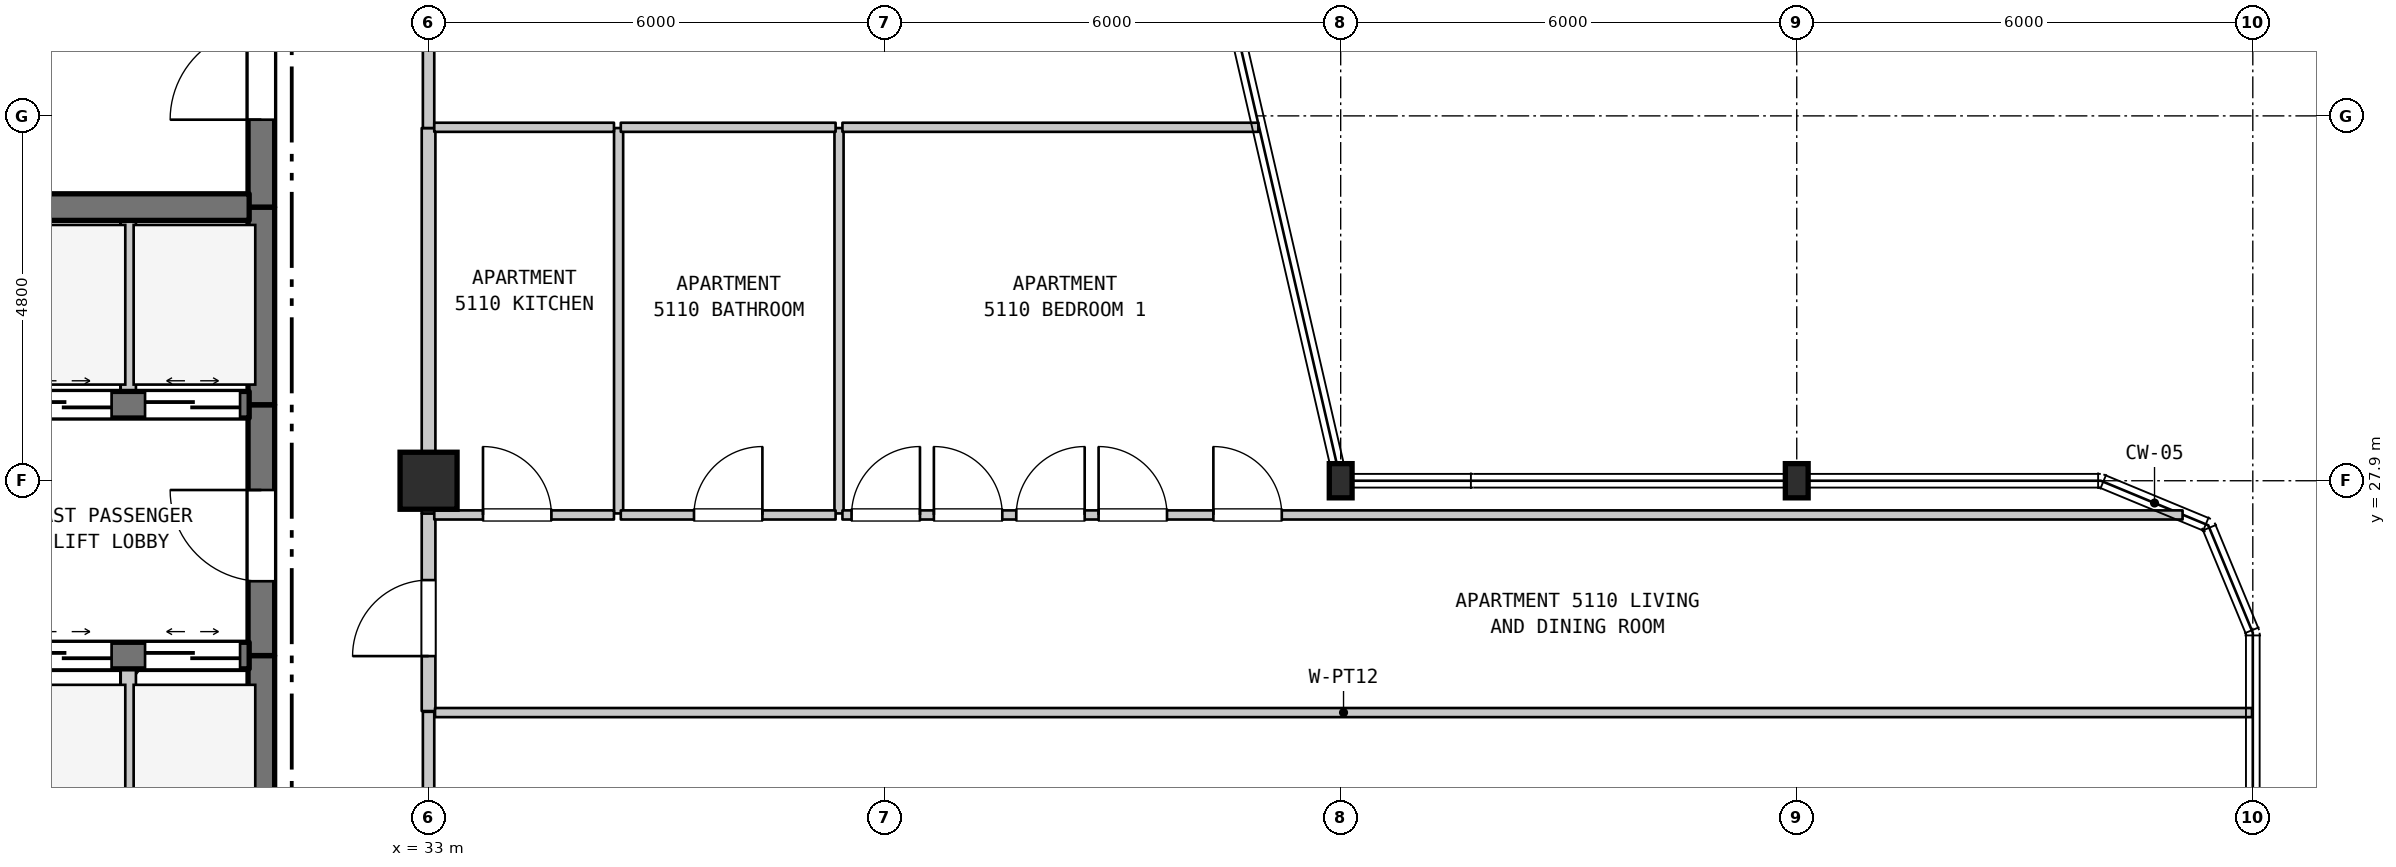
"""IFC4 building model, lengths in metres.
Left out: names, types, materials, properties, quantities, classifications, styles, units other than length and angle.
Written with IfcOpenShell. Run it as: python <this file> out.ifc"""

import sys

from ifc_helpers import new_model, si_unit, direction, frame, frame_2d, origin, origin_2d, place, context, subcontext, project, spatial, rectangle, i_section, extrude, element, fill, save


model = new_model("IFC4")
c1 = context("Model", 3, precision=1e-05, world=origin(), true_north=direction((0.0, 1.0)))
c2 = subcontext(c1, "Body", "Model", "MODEL_VIEW")
j1 = project(units=[si_unit("LENGTHUNIT", "METRE"), si_unit("PLANEANGLEUNIT", "RADIAN")], contexts=[c1])
p1 = place(None, origin())
s1 = spatial("IfcSite", under=j1, at=p1, CompositionType="ELEMENT")
p2 = place(p1, origin())
s2 = spatial("IfcBuilding", under=s1, at=p2, CompositionType="ELEMENT")
p3 = place(p2, frame((0.0, 0.0, 206.9)))
s3 = spatial("IfcBuildingStorey", under=s2, at=p3, CompositionType="ELEMENT", Elevation=206.9)
p4 = place(p3, frame((33.0, 27.9, 0.0), z_axis=(0.0, 0.0, 1.0), x_axis=(1.0, 0.0, 0.0)))
e1 = element("IfcColumn", 1, at=p4, inside=s3, PredefinedType="COLUMN", context=c2, shape_type="SweptSolid", body=[
    extrude(rectangle(XDim=0.75, YDim=0.75, at=origin_2d()), origin(), (0.0, 0.0, 1.0), 3.7),
])
for number, where, z_axis, x_axis in (
    (2, (45.0, 27.9, 0.0), (0.0, 0.0, 1.0), (1.0, 0.0, 0.0)),
    (3, (51.0, 27.9, 0.0), (0.0, 0.0, 1.0), (1.0, 0.0, 0.0)),
):
    element("IfcColumn", number, at=place(p3, frame(where, z_axis=z_axis, x_axis=x_axis)), inside=s3, PredefinedType="COLUMN", context=c2, shape_type="SweptSolid", body=[
        extrude(i_section(OverallWidth=0.3, OverallDepth=0.45, WebThickness=0.014, FlangeThickness=0.026, FilletRadius=0.027, at=origin_2d()), origin(), (0.0, 0.0, 1.0), 3.7),
    ])
p5 = place(p3, frame((29.05, 22.7, 0.0), z_axis=(0.0, 0.0, 1.0), x_axis=(0.0, 1.0, 0.0)))
e4 = element("IfcWall", 4, at=p5, inside=s3, PredefinedType="STANDARD", context=c2, shape_type="SweptSolid", body=[
    extrude(rectangle(XDim=2.9, YDim=0.2, at=frame_2d((1.45, 0.0))), origin(), (0.0, 0.0, 1.0), 3.39),
])
p6 = place(p3, frame((29.05, 28.9, 0.0), z_axis=(0.0, 0.0, 1.0), x_axis=(0.0, 1.0, 0.0)))
e5 = element("IfcWall", 5, at=p6, inside=s3, PredefinedType="STANDARD", context=c2, shape_type="SweptSolid", body=[
    extrude(rectangle(XDim=2.6, YDim=0.2, at=frame_2d((1.3, 0.0))), origin(), (0.0, 0.0, 1.0), 3.39),
])
p7 = place(p3, frame((30.8, 22.7, 0.0), z_axis=(0.0, 0.0, 1.0), x_axis=(0.0, 1.0, 0.0)))
e6 = element("IfcWall", 6, at=p7, inside=s3, PredefinedType="SHEAR", context=c2, shape_type="SweptSolid", body=[
    extrude(rectangle(XDim=2.9, YDim=0.35, at=frame_2d((1.45, 0.0))), origin(), (0.0, 0.0, 1.0), 3.39),
])
p8 = place(p3, frame((30.8, 25.6, 0.0), z_axis=(0.0, 0.0, 1.0), x_axis=(0.0, 1.0, 0.0)))
e7 = element("IfcWall", 7, at=p8, inside=s3, PredefinedType="SHEAR", context=c2, shape_type="SweptSolid", body=[
    extrude(rectangle(XDim=3.3, YDim=0.35, at=frame_2d((1.65, 0.0))), origin(), (0.0, 0.0, 1.0), 3.39),
])
p9 = place(p8, frame((0.978, 0.0, 0.0)))
e8 = element("IfcOpeningElement", 8, at=p9, cuts=e7, PredefinedType="OPENING", context=c2, shape_type="SweptSolid", body=[
    extrude(rectangle(XDim=1.2, YDim=2.2, at=frame_2d((0.6, 1.1))), frame((0.0, 0.185, 0.0), z_axis=(0.0, -1.0, 0.0), x_axis=(1.0, 0.0, 0.0)), (0.0, 0.0, 1.0), 0.37),
])
p10 = place(p3, frame((30.8, 28.9, 0.0), z_axis=(0.0, 0.0, 1.0), x_axis=(0.0, 1.0, 0.0)))
e9 = element("IfcWall", 9, at=p10, inside=s3, PredefinedType="SHEAR", context=c2, shape_type="SweptSolid", body=[
    extrude(rectangle(XDim=2.6, YDim=0.35, at=frame_2d((1.3, 0.0))), origin(), (0.0, 0.0, 1.0), 3.39),
])
p11 = place(p3, frame((30.8, 31.5, 0.0), z_axis=(0.0, 0.0, 1.0), x_axis=(0.0, 1.0, 0.0)))
e10 = element("IfcWall", 10, at=p11, inside=s3, PredefinedType="SHEAR", context=c2, shape_type="SweptSolid", body=[
    extrude(rectangle(XDim=3.5, YDim=0.35, at=frame_2d((1.75, 0.0))), origin(), (0.0, 0.0, 1.0), 3.39),
])
p12 = place(p11, frame((1.15, 0.0, 0.0)))
e11 = element("IfcOpeningElement", 11, at=p12, cuts=e10, PredefinedType="OPENING", context=c2, shape_type="SweptSolid", body=[
    extrude(rectangle(XDim=1.2, YDim=2.2, at=frame_2d((0.6, 1.1))), frame((0.0, 0.185, 0.0), z_axis=(0.0, -1.0, 0.0), x_axis=(1.0, 0.0, 0.0)), (0.0, 0.0, 1.0), 0.37),
])
p13 = place(p3, frame((33.0, 19.51, 0.0), z_axis=(0.0, 0.0, 1.0), x_axis=(0.0, 1.0, 0.0)))
e12 = element("IfcWall", 12, at=p13, inside=s3, PredefinedType="STANDARD", context=c2, shape_type="SweptSolid", body=[
    extrude(rectangle(XDim=5.35, YDim=0.15, at=frame_2d((2.675, 0.0))), origin(), (0.0, 0.0, 1.0), 2.99),
])
p14 = place(p13, frame((1.534, 0.0, 0.0)))
e13 = element("IfcOpeningElement", 13, at=p14, cuts=e12, PredefinedType="OPENING", context=c2, shape_type="SweptSolid", body=[
    extrude(rectangle(XDim=1.0, YDim=2.15, at=frame_2d((0.5, 1.075))), frame((0.0, 0.085, 0.0), z_axis=(0.0, -1.0, 0.0), x_axis=(1.0, 0.0, 0.0)), (0.0, 0.0, 1.0), 0.17),
])
p15 = place(p3, frame((33.0, 24.87, 0.0), z_axis=(0.0, 0.0, 1.0), x_axis=(0.0, 1.0, 0.0)))
e14 = element("IfcWall", 14, at=p15, inside=s3, PredefinedType="STANDARD", context=c2, shape_type="SweptSolid", body=[
    extrude(rectangle(XDim=2.6, YDim=0.18, at=frame_2d((1.3, 0.0))), origin(), (0.0, 0.0, 1.0), 2.99),
])
p16 = place(p15, frame((0.723, 0.0, 0.0)))
e15 = element("IfcOpeningElement", 15, at=p16, cuts=e14, PredefinedType="OPENING", context=c2, shape_type="SweptSolid", body=[
    extrude(rectangle(XDim=1.0, YDim=2.15, at=frame_2d((0.5, 1.075))), frame((0.0, 0.1, 0.0), z_axis=(0.0, -1.0, 0.0), x_axis=(1.0, 0.0, 0.0)), (0.0, 0.0, 1.0), 0.2),
])
p17 = place(p3, frame((33.0, 27.47, 0.0), z_axis=(0.0, 0.0, 1.0), x_axis=(0.0, 1.0, 0.0)))
e16 = element("IfcWall", 16, at=p17, inside=s3, PredefinedType="STANDARD", context=c2, shape_type="SweptSolid", body=[
    extrude(rectangle(XDim=5.07, YDim=0.18, at=frame_2d((2.535, 0.0))), origin(), (0.0, 0.0, 1.0), 2.89),
])
p18 = place(p3, frame((33.0, 32.54, 0.0), z_axis=(0.0, 0.0, 1.0), x_axis=(0.0, 1.0, 0.0)))
e17 = element("IfcWall", 17, at=p18, inside=s3, PredefinedType="STANDARD", context=c2, shape_type="SweptSolid", body=[
    extrude(rectangle(XDim=5.36, YDim=0.15, at=frame_2d((2.68, 0.0))), origin(), (0.0, 0.0, 1.0), 2.89),
])
p19 = place(p18, frame((2.109, 0.0, 0.0)))
e18 = element("IfcOpeningElement", 18, at=p19, cuts=e17, PredefinedType="OPENING", context=c2, shape_type="SweptSolid", body=[
    extrude(rectangle(XDim=1.0, YDim=2.15, at=frame_2d((0.5, 1.075))), frame((0.0, 0.085, 0.0), z_axis=(0.0, -1.0, 0.0), x_axis=(1.0, 0.0, 0.0)), (0.0, 0.0, 1.0), 0.17),
])
for number, where, z_axis, x_axis in (
    (19, (35.5, 27.47, 0.0), (0.0, 0.0, 1.0), (0.0, 1.0, 0.0)),
    (20, (38.4, 27.47, 0.0), (0.0, 0.0, 1.0), (0.0, 1.0, 0.0)),
):
    element("IfcWall", number, at=place(p3, frame(where, z_axis=z_axis, x_axis=x_axis)), inside=s3, PredefinedType="PARTITIONING", context=c2, shape_type="SweptSolid", body=[
        extrude(rectangle(XDim=5.07, YDim=0.12, at=frame_2d((2.535, 0.0))), origin(), (0.0, 0.0, 1.0), 3.39),
    ])
p20 = place(p3, frame((33.085, 24.85, 0.0), z_axis=(0.0, 0.0, 1.0), x_axis=(1.0, 0.0, 0.0)))
e21 = element("IfcWall", 21, at=p20, inside=s3, PredefinedType="PARTITIONING", context=c2, shape_type="SweptSolid", body=[
    extrude(rectangle(XDim=23.905, YDim=0.12, at=frame_2d((11.953, 0.0))), origin(), (0.0, 0.0, 1.0), 3.39),
])
p21 = place(p3, frame((27.46, 25.6, 0.0), z_axis=(0.0, 0.0, 1.0), x_axis=(1.0, 0.0, 0.0)))
e22 = element("IfcWall", 22, at=p21, inside=s3, PredefinedType="SHEAR", context=c2, shape_type="SweptSolid", body=[
    extrude(rectangle(XDim=3.18, YDim=0.35, at=frame_2d((1.59, 0.0))), origin(), (0.0, 0.0, 1.0), 3.39),
])
p22 = place(p21, frame((0.12, 0.0, 0.0)))
e23 = element("IfcOpeningElement", 23, at=p22, cuts=e22, PredefinedType="OPENING", context=c2, shape_type="SweptSolid", body=[
    extrude(rectangle(XDim=1.25, YDim=2.2, at=frame_2d((0.625, 1.1))), frame((0.0, 0.185, 0.0), z_axis=(0.0, -1.0, 0.0), x_axis=(1.0, 0.0, 0.0)), (0.0, 0.0, 1.0), 0.37),
])
p23 = place(p21, frame((1.81, 0.0, 0.0)))
e24 = element("IfcOpeningElement", 24, at=p23, cuts=e22, PredefinedType="OPENING", context=c2, shape_type="SweptSolid", body=[
    extrude(rectangle(XDim=1.25, YDim=2.2, at=frame_2d((0.625, 1.1))), frame((0.0, 0.185, 0.0), z_axis=(0.0, -1.0, 0.0), x_axis=(1.0, 0.0, 0.0)), (0.0, 0.0, 1.0), 0.37),
])
p24 = place(p3, frame((33.075, 27.45, 0.0), z_axis=(0.0, 0.0, 1.0), x_axis=(1.0, 0.0, 0.0)))
e25 = element("IfcWall", 25, at=p24, inside=s3, PredefinedType="PARTITIONING", context=c2, shape_type="SweptSolid", body=[
    extrude(rectangle(XDim=2.364, YDim=0.12, at=frame_2d((1.182, 0.0))), origin(), (0.0, 0.0, 1.0), 3.39),
])
p25 = place(p24, frame((0.641, 0.0, 0.0)))
e26 = element("IfcOpeningElement", 26, at=p25, cuts=e25, PredefinedType="OPENING", context=c2, shape_type="SweptSolid", body=[
    extrude(rectangle(XDim=0.9, YDim=2.15, at=frame_2d((0.45, 1.075))), frame((0.0, 0.07, 0.0), z_axis=(0.0, -1.0, 0.0), x_axis=(1.0, 0.0, 0.0)), (0.0, 0.0, 1.0), 0.14),
])
p26 = place(p3, frame((35.529, 27.45, 0.0), z_axis=(0.0, 0.0, 1.0), x_axis=(1.0, 0.0, 0.0)))
e27 = element("IfcWall", 27, at=p26, inside=s3, PredefinedType="PARTITIONING", context=c2, shape_type="SweptSolid", body=[
    extrude(rectangle(XDim=2.826, YDim=0.12, at=frame_2d((1.413, 0.0))), origin(), (0.0, 0.0, 1.0), 3.39),
])
p27 = place(p26, frame((0.963, 0.0, 0.0)))
e28 = element("IfcOpeningElement", 28, at=p27, cuts=e27, PredefinedType="OPENING", context=c2, shape_type="SweptSolid", body=[
    extrude(rectangle(XDim=0.9, YDim=2.1, at=frame_2d((0.45, 1.05))), frame((0.0, 0.07, 0.0), z_axis=(0.0, -1.0, 0.0), x_axis=(1.0, 0.0, 0.0)), (0.0, 0.0, 1.0), 0.14),
])
p28 = place(p3, frame((38.445, 27.45, 0.0), z_axis=(0.0, 0.0, 1.0), x_axis=(1.0, 0.0, 0.0)))
e29 = element("IfcWall", 29, at=p28, inside=s3, PredefinedType="PARTITIONING", context=c2, shape_type="SweptSolid", body=[
    extrude(rectangle(XDim=17.631, YDim=0.12, at=frame_2d((8.815, 0.0))), origin(), (0.0, 0.0, 1.0), 3.39),
])
p29 = place(p28, frame((4.88, 0.0, 0.0)))
e30 = element("IfcOpeningElement", 30, at=p29, cuts=e29, PredefinedType="OPENING", context=c2, shape_type="SweptSolid", body=[
    extrude(rectangle(XDim=0.9, YDim=2.15, at=frame_2d((0.45, 1.075))), frame((0.0, 0.07, 0.0), z_axis=(0.0, -1.0, 0.0), x_axis=(1.0, 0.0, 0.0)), (0.0, 0.0, 1.0), 0.14),
])
p30 = place(p28, frame((0.12, 0.0, 0.0)))
e31 = element("IfcOpeningElement", 31, at=p30, cuts=e29, PredefinedType="OPENING", context=c2, shape_type="SweptSolid", body=[
    extrude(rectangle(XDim=0.9, YDim=2.15, at=frame_2d((0.45, 1.075))), frame((0.0, 0.07, 0.0), z_axis=(0.0, -1.0, 0.0), x_axis=(1.0, 0.0, 0.0)), (0.0, 0.0, 1.0), 0.14),
])
p31 = place(p28, frame((1.203, 0.0, 0.0)))
e32 = element("IfcOpeningElement", 32, at=p31, cuts=e29, PredefinedType="OPENING", context=c2, shape_type="SweptSolid", body=[
    extrude(rectangle(XDim=0.9, YDim=2.15, at=frame_2d((0.45, 1.075))), frame((0.0, 0.07, 0.0), z_axis=(0.0, -1.0, 0.0), x_axis=(1.0, 0.0, 0.0)), (0.0, 0.0, 1.0), 0.14),
])
p32 = place(p28, frame((2.287, 0.0, 0.0)))
e33 = element("IfcOpeningElement", 33, at=p32, cuts=e29, PredefinedType="OPENING", context=c2, shape_type="SweptSolid", body=[
    extrude(rectangle(XDim=0.9, YDim=2.15, at=frame_2d((0.45, 1.075))), frame((0.0, 0.07, 0.0), z_axis=(0.0, -1.0, 0.0), x_axis=(1.0, 0.0, 0.0)), (0.0, 0.0, 1.0), 0.14),
])
p33 = place(p28, frame((3.37, 0.0, 0.0)))
e34 = element("IfcOpeningElement", 34, at=p33, cuts=e29, PredefinedType="OPENING", context=c2, shape_type="SweptSolid", body=[
    extrude(rectangle(XDim=0.9, YDim=2.15, at=frame_2d((0.45, 1.075))), frame((0.0, 0.07, 0.0), z_axis=(0.0, -1.0, 0.0), x_axis=(1.0, 0.0, 0.0)), (0.0, 0.0, 1.0), 0.14),
])
p34 = place(p3, frame((27.46, 28.9, 0.0), z_axis=(0.0, 0.0, 1.0), x_axis=(1.0, 0.0, 0.0)))
e35 = element("IfcWall", 35, at=p34, inside=s3, PredefinedType="SHEAR", context=c2, shape_type="SweptSolid", body=[
    extrude(rectangle(XDim=3.18, YDim=0.35, at=frame_2d((1.59, 0.0))), origin(), (0.0, 0.0, 1.0), 3.39),
])
p35 = place(p34, frame((0.12, 0.0, 0.0)))
e36 = element("IfcOpeningElement", 36, at=p35, cuts=e35, PredefinedType="OPENING", context=c2, shape_type="SweptSolid", body=[
    extrude(rectangle(XDim=1.25, YDim=2.2, at=frame_2d((0.625, 1.1))), frame((0.0, 0.185, 0.0), z_axis=(0.0, -1.0, 0.0), x_axis=(1.0, 0.0, 0.0)), (0.0, 0.0, 1.0), 0.37),
])
p36 = place(p34, frame((1.81, 0.0, 0.0)))
e37 = element("IfcOpeningElement", 37, at=p36, cuts=e35, PredefinedType="OPENING", context=c2, shape_type="SweptSolid", body=[
    extrude(rectangle(XDim=1.25, YDim=2.2, at=frame_2d((0.625, 1.1))), frame((0.0, 0.185, 0.0), z_axis=(0.0, -1.0, 0.0), x_axis=(1.0, 0.0, 0.0)), (0.0, 0.0, 1.0), 0.37),
])
p37 = place(p3, frame((27.46, 31.5, 0.0), z_axis=(0.0, 0.0, 1.0), x_axis=(1.0, 0.0, 0.0)))
e38 = element("IfcWall", 38, at=p37, inside=s3, PredefinedType="SHEAR", context=c2, shape_type="SweptSolid", body=[
    extrude(rectangle(XDim=3.18, YDim=0.35, at=frame_2d((1.59, 0.0))), origin(), (0.0, 0.0, 1.0), 3.39),
])
p38 = place(p3, frame((33.075, 32.55, 0.0), z_axis=(0.0, 0.0, 1.0), x_axis=(1.0, 0.0, 0.0)))
e39 = element("IfcWall", 39, at=p38, inside=s3, PredefinedType="PARTITIONING", context=c2, shape_type="SweptSolid", body=[
    extrude(rectangle(XDim=2.364, YDim=0.12, at=frame_2d((1.182, 0.0))), origin(), (0.0, 0.0, 1.0), 3.39),
])
p39 = place(p3, frame((35.529, 32.55, 0.0), z_axis=(0.0, 0.0, 1.0), x_axis=(1.0, 0.0, 0.0)))
e40 = element("IfcWall", 40, at=p39, inside=s3, PredefinedType="PARTITIONING", context=c2, shape_type="SweptSolid", body=[
    extrude(rectangle(XDim=2.826, YDim=0.12, at=frame_2d((1.413, 0.0))), origin(), (0.0, 0.0, 1.0), 3.39),
])
p40 = place(p3, frame((38.445, 32.55, 0.0), z_axis=(0.0, 0.0, 1.0), x_axis=(1.0, 0.0, 0.0)))
e41 = element("IfcWall", 41, at=p40, inside=s3, PredefinedType="PARTITIONING", context=c2, shape_type="SweptSolid", body=[
    extrude(rectangle(XDim=5.472, YDim=0.12, at=frame_2d((2.736, 0.0))), origin(), (0.0, 0.0, 1.0), 3.39),
])
p41 = place(p9, origin())
e42 = element("IfcDoor", 42, at=p41, inside=s3, OperationType="SINGLE_SWING_RIGHT", PredefinedType="DOOR", context=c2, shape_type="SweptSolid", body=[
    extrude(rectangle(XDim=1.2, YDim=2.2, at=frame_2d((0.6, 1.1))), frame((0.0, 0.025, 0.0), z_axis=(0.0, -1.0, 0.0), x_axis=(1.0, 0.0, 0.0)), (0.0, 0.0, 1.0), 0.05),
])
fill(e8, e42)
p42 = place(p12, origin())
e43 = element("IfcDoor", 43, at=p42, inside=s3, OperationType="SINGLE_SWING_LEFT", PredefinedType="DOOR", context=c2, shape_type="SweptSolid", body=[
    extrude(rectangle(XDim=1.2, YDim=2.2, at=frame_2d((0.6, 1.1))), frame((0.0, 0.025, 0.0), z_axis=(0.0, -1.0, 0.0), x_axis=(1.0, 0.0, 0.0)), (0.0, 0.0, 1.0), 0.05),
])
fill(e11, e43)
p43 = place(p16, origin())
e44 = element("IfcDoor", 44, at=p43, inside=s3, OperationType="SINGLE_SWING_LEFT", PredefinedType="DOOR", context=c2, shape_type="SweptSolid", body=[
    extrude(rectangle(XDim=1.0, YDim=2.15, at=frame_2d((0.5, 1.075))), frame((0.0, 0.025, 0.0), z_axis=(0.0, -1.0, 0.0), x_axis=(1.0, 0.0, 0.0)), (0.0, 0.0, 1.0), 0.05),
])
fill(e15, e44)
p44 = place(p22, origin())
e45 = element("IfcDoor", 45, at=p44, inside=s3, OperationType="DOUBLE_DOOR_SLIDING", PredefinedType="DOOR", context=c2, shape_type="SweptSolid", body=[
    extrude(rectangle(XDim=1.25, YDim=2.2, at=frame_2d((0.625, 1.1))), frame((0.0, 0.025, 0.0), z_axis=(0.0, -1.0, 0.0), x_axis=(1.0, 0.0, 0.0)), (0.0, 0.0, 1.0), 0.05),
])
fill(e23, e45)
p45 = place(p23, origin())
e46 = element("IfcDoor", 46, at=p45, inside=s3, OperationType="DOUBLE_DOOR_SLIDING", PredefinedType="DOOR", context=c2, shape_type="SweptSolid", body=[
    extrude(rectangle(XDim=1.25, YDim=2.2, at=frame_2d((0.625, 1.1))), frame((0.0, 0.025, 0.0), z_axis=(0.0, -1.0, 0.0), x_axis=(1.0, 0.0, 0.0)), (0.0, 0.0, 1.0), 0.05),
])
fill(e24, e46)
p46 = place(p25, origin())
e47 = element("IfcDoor", 47, at=p46, inside=s3, OperationType="SINGLE_SWING_LEFT", PredefinedType="DOOR", context=c2, shape_type="SweptSolid", body=[
    extrude(rectangle(XDim=0.9, YDim=2.15, at=frame_2d((0.45, 1.075))), frame((0.0, 0.025, 0.0), z_axis=(0.0, -1.0, 0.0), x_axis=(1.0, 0.0, 0.0)), (0.0, 0.0, 1.0), 0.05),
])
fill(e26, e47)
p47 = place(p27, origin())
e48 = element("IfcDoor", 48, at=p47, inside=s3, OperationType="SINGLE_SWING_RIGHT", PredefinedType="DOOR", context=c2, shape_type="SweptSolid", body=[
    extrude(rectangle(XDim=0.9, YDim=2.1, at=frame_2d((0.45, 1.05))), frame((0.0, 0.025, 0.0), z_axis=(0.0, -1.0, 0.0), x_axis=(1.0, 0.0, 0.0)), (0.0, 0.0, 1.0), 0.05),
])
fill(e28, e48)
p48 = place(p29, origin())
e49 = element("IfcDoor", 49, at=p48, inside=s3, OperationType="SINGLE_SWING_LEFT", PredefinedType="DOOR", context=c2, shape_type="SweptSolid", body=[
    extrude(rectangle(XDim=0.9, YDim=2.15, at=frame_2d((0.45, 1.075))), frame((0.0, 0.025, 0.0), z_axis=(0.0, -1.0, 0.0), x_axis=(1.0, 0.0, 0.0)), (0.0, 0.0, 1.0), 0.05),
])
fill(e30, e49)
p49 = place(p30, origin())
e50 = element("IfcDoor", 50, at=p49, inside=s3, OperationType="SINGLE_SWING_RIGHT", PredefinedType="DOOR", context=c2, shape_type="SweptSolid", body=[
    extrude(rectangle(XDim=0.9, YDim=2.15, at=frame_2d((0.45, 1.075))), frame((0.0, 0.025, 0.0), z_axis=(0.0, -1.0, 0.0), x_axis=(1.0, 0.0, 0.0)), (0.0, 0.0, 1.0), 0.05),
])
fill(e31, e50)
p50 = place(p31, origin())
e51 = element("IfcDoor", 51, at=p50, inside=s3, OperationType="SINGLE_SWING_LEFT", PredefinedType="DOOR", context=c2, shape_type="SweptSolid", body=[
    extrude(rectangle(XDim=0.9, YDim=2.15, at=frame_2d((0.45, 1.075))), frame((0.0, 0.025, 0.0), z_axis=(0.0, -1.0, 0.0), x_axis=(1.0, 0.0, 0.0)), (0.0, 0.0, 1.0), 0.05),
])
fill(e32, e51)
p51 = place(p32, origin())
e52 = element("IfcDoor", 52, at=p51, inside=s3, OperationType="SINGLE_SWING_RIGHT", PredefinedType="DOOR", context=c2, shape_type="SweptSolid", body=[
    extrude(rectangle(XDim=0.9, YDim=2.15, at=frame_2d((0.45, 1.075))), frame((0.0, 0.025, 0.0), z_axis=(0.0, -1.0, 0.0), x_axis=(1.0, 0.0, 0.0)), (0.0, 0.0, 1.0), 0.05),
])
fill(e33, e52)
p52 = place(p33, origin())
e53 = element("IfcDoor", 53, at=p52, inside=s3, OperationType="SINGLE_SWING_LEFT", PredefinedType="DOOR", context=c2, shape_type="SweptSolid", body=[
    extrude(rectangle(XDim=0.9, YDim=2.15, at=frame_2d((0.45, 1.075))), frame((0.0, 0.025, 0.0), z_axis=(0.0, -1.0, 0.0), x_axis=(1.0, 0.0, 0.0)), (0.0, 0.0, 1.0), 0.05),
])
fill(e34, e53)
p53 = place(p35, origin())
e54 = element("IfcDoor", 54, at=p53, inside=s3, OperationType="DOUBLE_DOOR_SLIDING", PredefinedType="DOOR", context=c2, shape_type="SweptSolid", body=[
    extrude(rectangle(XDim=1.25, YDim=2.2, at=frame_2d((0.625, 1.1))), frame((0.0, 0.025, 0.0), z_axis=(0.0, -1.0, 0.0), x_axis=(1.0, 0.0, 0.0)), (0.0, 0.0, 1.0), 0.05),
])
fill(e36, e54)
p54 = place(p36, origin())
e55 = element("IfcDoor", 55, at=p54, inside=s3, OperationType="DOUBLE_DOOR_SLIDING", PredefinedType="DOOR", context=c2, shape_type="SweptSolid", body=[
    extrude(rectangle(XDim=1.25, YDim=2.2, at=frame_2d((0.625, 1.1))), frame((0.0, 0.025, 0.0), z_axis=(0.0, -1.0, 0.0), x_axis=(1.0, 0.0, 0.0)), (0.0, 0.0, 1.0), 0.05),
])
fill(e37, e55)
save(model, sys.argv[1])
